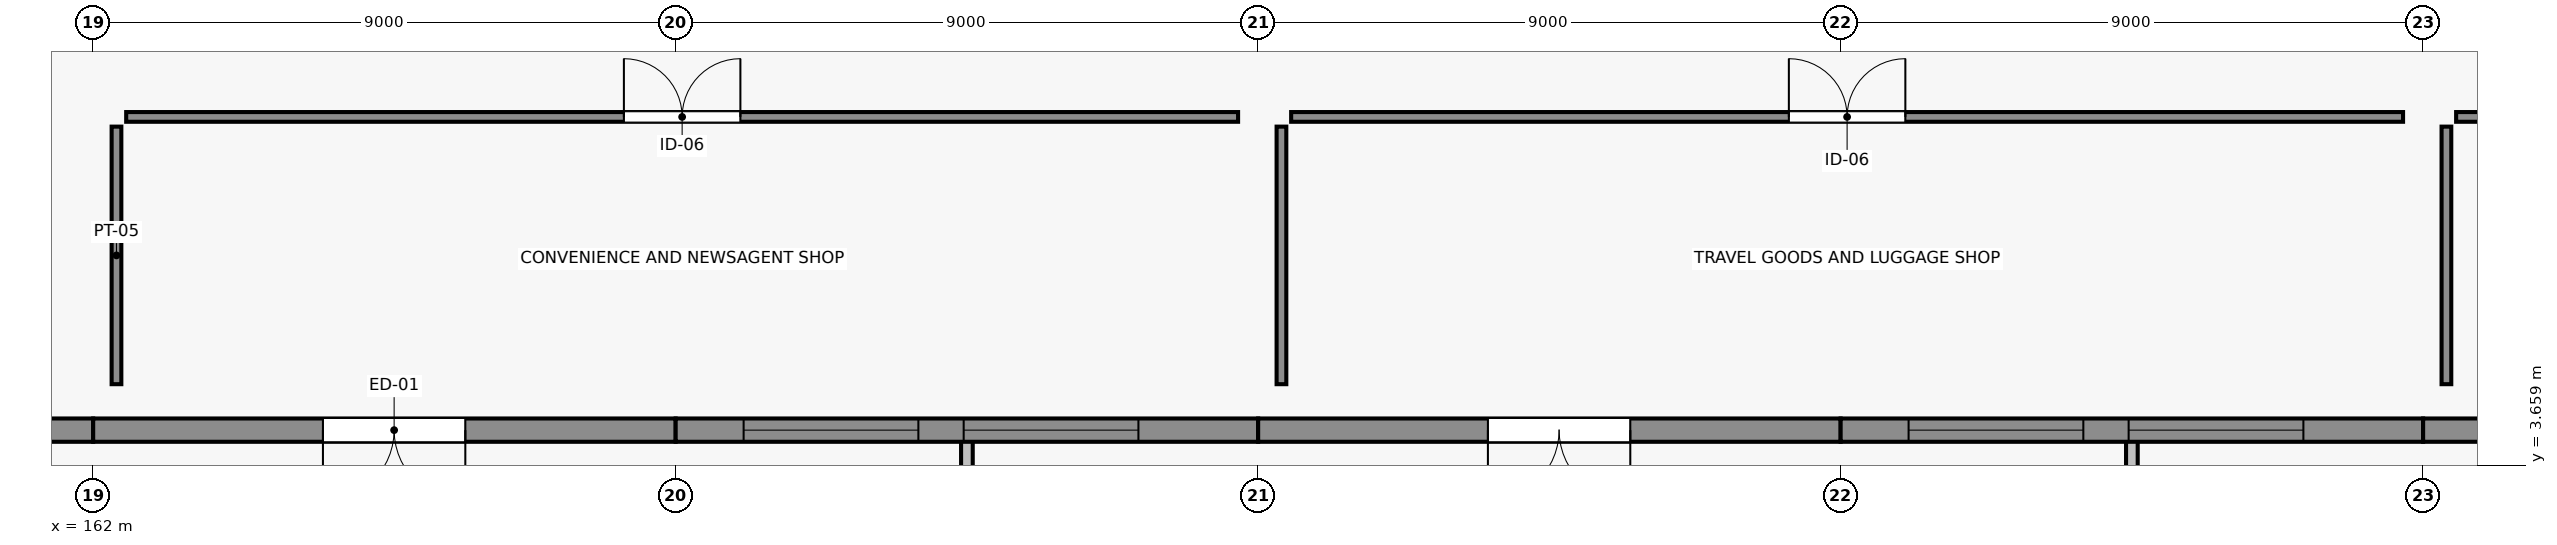
"""IFC4 building model, lengths in metres.
Left out: names, types, materials, properties, quantities, classifications, styles, units other than length and angle.
Written with IfcOpenShell. Run it as: python <this file> out.ifc"""

import sys

from ifc_helpers import new_model, si_unit, direction, frame, frame_2d, origin, place, context, subcontext, project, spatial, rectangle, extrude, element, fill, save


model = new_model("IFC4")
c1 = context("Model", 3, precision=1e-05, world=origin(), true_north=direction((0.0, 1.0)))
c2 = subcontext(c1, "Body", "Model", "MODEL_VIEW")
j1 = project(units=[si_unit("LENGTHUNIT", "METRE"), si_unit("PLANEANGLEUNIT", "RADIAN")], contexts=[c1])
p1 = place(None, origin())
s1 = spatial("IfcSite", under=j1, at=p1, CompositionType="ELEMENT")
p2 = place(p1, origin())
s2 = spatial("IfcBuilding", under=s1, at=p2, CompositionType="ELEMENT")
p3 = place(p2, origin())
s3 = spatial("IfcBuildingStorey", under=s2, at=p3, CompositionType="ELEMENT", Elevation=0.0)
p4 = place(p3, frame((162.0, 4.2, 0.0), z_axis=(0.0, 0.0, 1.0), x_axis=(-1.0, 0.0, 0.0)))
e1 = element("IfcWall", 1, at=p4, inside=s3, PredefinedType="SOLIDWALL", context=c2, shape_type="SweptSolid", body=[
    extrude(rectangle(XDim=9.0, YDim=0.36, at=frame_2d((4.5, 0.0))), origin(), (0.0, 0.0, 1.0), 4.15),
])
p5 = place(p4, frame((1.85, 0.0, 1.0)))
e2 = element("IfcOpeningElement", 2, at=p5, cuts=e1, PredefinedType="OPENING", context=c2, shape_type="SweptSolid", body=[
    extrude(rectangle(XDim=2.7, YDim=1.8, at=frame_2d((1.35, 0.9))), frame((0.0, 0.19, 0.0), z_axis=(0.0, -1.0, 0.0), x_axis=(1.0, 0.0, 0.0)), (0.0, 0.0, 1.0), 0.38),
])
p6 = place(p4, frame((5.25, 0.0, 1.0)))
e3 = element("IfcOpeningElement", 3, at=p6, cuts=e1, PredefinedType="OPENING", context=c2, shape_type="SweptSolid", body=[
    extrude(rectangle(XDim=2.7, YDim=1.8, at=frame_2d((1.35, 0.9))), frame((0.0, 0.19, 0.0), z_axis=(0.0, -1.0, 0.0), x_axis=(1.0, 0.0, 0.0)), (0.0, 0.0, 1.0), 0.38),
])
p7 = place(p3, frame((171.0, 4.2, 0.0), z_axis=(0.0, 0.0, 1.0), x_axis=(-1.0, 0.0, 0.0)))
e4 = element("IfcWall", 4, at=p7, inside=s3, PredefinedType="SOLIDWALL", context=c2, shape_type="SweptSolid", body=[
    extrude(rectangle(XDim=9.0, YDim=0.36, at=frame_2d((4.5, 0.0))), origin(), (0.0, 0.0, 1.0), 4.15),
])
p8 = place(p7, frame((3.25, 0.0, 0.0)))
e5 = element("IfcOpeningElement", 5, at=p8, cuts=e4, PredefinedType="OPENING", context=c2, shape_type="SweptSolid", body=[
    extrude(rectangle(XDim=2.2, YDim=2.4, at=frame_2d((1.1, 1.2))), frame((0.0, 0.19, 0.0), z_axis=(0.0, -1.0, 0.0), x_axis=(1.0, 0.0, 0.0)), (0.0, 0.0, 1.0), 0.38),
])
p9 = place(p3, frame((180.0, 4.2, 0.0), z_axis=(0.0, 0.0, 1.0), x_axis=(-1.0, 0.0, 0.0)))
e6 = element("IfcWall", 6, at=p9, inside=s3, PredefinedType="SOLIDWALL", context=c2, shape_type="SweptSolid", body=[
    extrude(rectangle(XDim=9.0, YDim=0.36, at=frame_2d((4.5, 0.0))), origin(), (0.0, 0.0, 1.0), 4.15),
])
p10 = place(p9, frame((1.85, 0.0, 1.0)))
e7 = element("IfcOpeningElement", 7, at=p10, cuts=e6, PredefinedType="OPENING", context=c2, shape_type="SweptSolid", body=[
    extrude(rectangle(XDim=2.7, YDim=1.8, at=frame_2d((1.35, 0.9))), frame((0.0, 0.19, 0.0), z_axis=(0.0, -1.0, 0.0), x_axis=(1.0, 0.0, 0.0)), (0.0, 0.0, 1.0), 0.38),
])
p11 = place(p9, frame((5.25, 0.0, 1.0)))
e8 = element("IfcOpeningElement", 8, at=p11, cuts=e6, PredefinedType="OPENING", context=c2, shape_type="SweptSolid", body=[
    extrude(rectangle(XDim=2.7, YDim=1.8, at=frame_2d((1.35, 0.9))), frame((0.0, 0.19, 0.0), z_axis=(0.0, -1.0, 0.0), x_axis=(1.0, 0.0, 0.0)), (0.0, 0.0, 1.0), 0.38),
])
p12 = place(p3, frame((189.0, 4.2, 0.0), z_axis=(0.0, 0.0, 1.0), x_axis=(-1.0, 0.0, 0.0)))
e9 = element("IfcWall", 9, at=p12, inside=s3, PredefinedType="SOLIDWALL", context=c2, shape_type="SweptSolid", body=[
    extrude(rectangle(XDim=9.0, YDim=0.36, at=frame_2d((4.5, 0.0))), origin(), (0.0, 0.0, 1.0), 4.15),
])
p13 = place(p12, frame((3.25, 0.0, 0.0)))
e10 = element("IfcOpeningElement", 10, at=p13, cuts=e9, PredefinedType="OPENING", context=c2, shape_type="SweptSolid", body=[
    extrude(rectangle(XDim=2.2, YDim=2.4, at=frame_2d((1.1, 1.2))), frame((0.0, 0.19, 0.0), z_axis=(0.0, -1.0, 0.0), x_axis=(1.0, 0.0, 0.0)), (0.0, 0.0, 1.0), 0.38),
])
p14 = place(p3, frame((198.0, 4.2, 0.0), z_axis=(0.0, 0.0, 1.0), x_axis=(-1.0, 0.0, 0.0)))
e11 = element("IfcWall", 11, at=p14, inside=s3, PredefinedType="SOLIDWALL", context=c2, shape_type="SweptSolid", body=[
    extrude(rectangle(XDim=9.0, YDim=0.36, at=frame_2d((4.5, 0.0))), origin(), (0.0, 0.0, 1.0), 4.15),
])
p15 = place(p14, frame((1.85, 0.0, 1.0)))
e12 = element("IfcOpeningElement", 12, at=p15, cuts=e11, PredefinedType="OPENING", context=c2, shape_type="SweptSolid", body=[
    extrude(rectangle(XDim=2.7, YDim=1.8, at=frame_2d((1.35, 0.9))), frame((0.0, 0.19, 0.0), z_axis=(0.0, -1.0, 0.0), x_axis=(1.0, 0.0, 0.0)), (0.0, 0.0, 1.0), 0.38),
])
p16 = place(p14, frame((5.25, 0.0, 1.0)))
e13 = element("IfcOpeningElement", 13, at=p16, cuts=e11, PredefinedType="OPENING", context=c2, shape_type="SweptSolid", body=[
    extrude(rectangle(XDim=2.7, YDim=1.8, at=frame_2d((1.35, 0.9))), frame((0.0, 0.19, 0.0), z_axis=(0.0, -1.0, 0.0), x_axis=(1.0, 0.0, 0.0)), (0.0, 0.0, 1.0), 0.38),
])
p17 = place(p3, frame((207.0, 4.2, 0.0), z_axis=(0.0, 0.0, 1.0), x_axis=(-1.0, 0.0, 0.0)))
e14 = element("IfcWall", 14, at=p17, inside=s3, PredefinedType="SOLIDWALL", context=c2, shape_type="SweptSolid", body=[
    extrude(rectangle(XDim=9.0, YDim=0.36, at=frame_2d((4.5, 0.0))), origin(), (0.0, 0.0, 1.0), 4.15),
])
p18 = place(p17, frame((3.25, 0.0, 0.0)))
e15 = element("IfcOpeningElement", 15, at=p18, cuts=e14, PredefinedType="OPENING", context=c2, shape_type="SweptSolid", body=[
    extrude(rectangle(XDim=2.2, YDim=2.4, at=frame_2d((1.1, 1.2))), frame((0.0, 0.19, 0.0), z_axis=(0.0, -1.0, 0.0), x_axis=(1.0, 0.0, 0.0)), (0.0, 0.0, 1.0), 0.38),
])
p19 = place(p3, frame((162.51, 9.04, 0.0), z_axis=(0.0, 0.0, 1.0), x_axis=(1.0, 0.0, 0.0)))
e16 = element("IfcWall", 16, at=p19, inside=s3, PredefinedType="PARTITIONING", context=c2, shape_type="SweptSolid", body=[
    extrude(rectangle(XDim=17.18, YDim=0.15, at=frame_2d((8.59, 0.0))), origin(), (0.0, 0.0, 1.0), 3.975),
])
p20 = place(p19, frame((7.69, 0.0, 0.0)))
e17 = element("IfcOpeningElement", 17, at=p20, cuts=e16, PredefinedType="OPENING", context=c2, shape_type="SweptSolid", body=[
    extrude(rectangle(XDim=1.8, YDim=2.3, at=frame_2d((0.9, 1.15))), frame((0.0, 0.085, 0.0), z_axis=(0.0, -1.0, 0.0), x_axis=(1.0, 0.0, 0.0)), (0.0, 0.0, 1.0), 0.17),
])
p21 = place(p3, frame((162.36, 4.91, 0.0), z_axis=(0.0, 0.0, 1.0), x_axis=(0.0, 1.0, 0.0)))
e18 = element("IfcWall", 18, at=p21, inside=s3, PredefinedType="PARTITIONING", context=c2, shape_type="SweptSolid", body=[
    extrude(rectangle(XDim=3.98, YDim=0.15, at=frame_2d((1.99, 0.0))), origin(), (0.0, 0.0, 1.0), 4.55),
])
p22 = place(p3, frame((180.51, 9.04, 0.0), z_axis=(0.0, 0.0, 1.0), x_axis=(1.0, 0.0, 0.0)))
e19 = element("IfcWall", 19, at=p22, inside=s3, PredefinedType="PARTITIONING", context=c2, shape_type="SweptSolid", body=[
    extrude(rectangle(XDim=17.18, YDim=0.15, at=frame_2d((8.59, 0.0))), origin(), (0.0, 0.0, 1.0), 3.975),
])
p23 = place(p22, frame((7.69, 0.0, 0.0)))
e20 = element("IfcOpeningElement", 20, at=p23, cuts=e19, PredefinedType="OPENING", context=c2, shape_type="SweptSolid", body=[
    extrude(rectangle(XDim=1.8, YDim=2.3, at=frame_2d((0.9, 1.15))), frame((0.0, 0.085, 0.0), z_axis=(0.0, -1.0, 0.0), x_axis=(1.0, 0.0, 0.0)), (0.0, 0.0, 1.0), 0.17),
])
p24 = place(p3, frame((180.36, 4.91, 0.0), z_axis=(0.0, 0.0, 1.0), x_axis=(0.0, 1.0, 0.0)))
e21 = element("IfcWall", 21, at=p24, inside=s3, PredefinedType="PARTITIONING", context=c2, shape_type="SweptSolid", body=[
    extrude(rectangle(XDim=3.98, YDim=0.15, at=frame_2d((1.99, 0.0))), origin(), (0.0, 0.0, 1.0), 4.55),
])
p25 = place(p3, frame((198.51, 9.04, 0.0), z_axis=(0.0, 0.0, 1.0), x_axis=(1.0, 0.0, 0.0)))
e22 = element("IfcWall", 22, at=p25, inside=s3, PredefinedType="PARTITIONING", context=c2, shape_type="SweptSolid", body=[
    extrude(rectangle(XDim=16.68, YDim=0.15, at=frame_2d((8.34, 0.0))), origin(), (0.0, 0.0, 1.0), 3.975),
])
p26 = place(p25, frame((7.44, 0.0, 0.0)))
e23 = element("IfcOpeningElement", 23, at=p26, cuts=e22, PredefinedType="OPENING", context=c2, shape_type="SweptSolid", body=[
    extrude(rectangle(XDim=1.8, YDim=2.3, at=frame_2d((0.9, 1.15))), frame((0.0, 0.085, 0.0), z_axis=(0.0, -1.0, 0.0), x_axis=(1.0, 0.0, 0.0)), (0.0, 0.0, 1.0), 0.17),
])
p27 = place(p3, frame((198.36, 4.91, 0.0), z_axis=(0.0, 0.0, 1.0), x_axis=(0.0, 1.0, 0.0)))
e24 = element("IfcWall", 24, at=p27, inside=s3, PredefinedType="PARTITIONING", context=c2, shape_type="SweptSolid", body=[
    extrude(rectangle(XDim=3.98, YDim=0.15, at=frame_2d((1.99, 0.0))), origin(), (0.0, 0.0, 1.0), 4.55),
])
p28 = place(p8, origin())
e25 = element("IfcDoor", 25, at=p28, inside=s3, OperationType="DOUBLE_DOOR_SINGLE_SWING", PredefinedType="DOOR", context=c2, shape_type="SweptSolid", body=[
    extrude(rectangle(XDim=2.2, YDim=2.4, at=frame_2d((1.1, 1.2))), frame((0.0, 0.025, 0.0), z_axis=(0.0, -1.0, 0.0), x_axis=(1.0, 0.0, 0.0)), (0.0, 0.0, 1.0), 0.05),
])
fill(e5, e25)
p29 = place(p10, origin())
e26 = element("IfcWindow", 26, at=p29, inside=s3, PartitioningType="SINGLE_PANEL", PredefinedType="WINDOW", context=c2, shape_type="SweptSolid", body=[
    extrude(rectangle(XDim=2.7, YDim=1.8, at=frame_2d((1.35, 0.9))), frame((0.0, 0.03, 0.0), z_axis=(0.0, -1.0, 0.0), x_axis=(1.0, 0.0, 0.0)), (0.0, 0.0, 1.0), 0.06),
])
fill(e7, e26)
p30 = place(p11, origin())
e27 = element("IfcWindow", 27, at=p30, inside=s3, PartitioningType="SINGLE_PANEL", PredefinedType="WINDOW", context=c2, shape_type="SweptSolid", body=[
    extrude(rectangle(XDim=2.7, YDim=1.8, at=frame_2d((1.35, 0.9))), frame((0.0, 0.03, 0.0), z_axis=(0.0, -1.0, 0.0), x_axis=(1.0, 0.0, 0.0)), (0.0, 0.0, 1.0), 0.06),
])
fill(e8, e27)
p31 = place(p13, origin())
e28 = element("IfcDoor", 28, at=p31, inside=s3, OperationType="DOUBLE_DOOR_SINGLE_SWING", PredefinedType="DOOR", context=c2, shape_type="SweptSolid", body=[
    extrude(rectangle(XDim=2.2, YDim=2.4, at=frame_2d((1.1, 1.2))), frame((0.0, 0.025, 0.0), z_axis=(0.0, -1.0, 0.0), x_axis=(1.0, 0.0, 0.0)), (0.0, 0.0, 1.0), 0.05),
])
fill(e10, e28)
p32 = place(p15, origin())
e29 = element("IfcWindow", 29, at=p32, inside=s3, PartitioningType="SINGLE_PANEL", PredefinedType="WINDOW", context=c2, shape_type="SweptSolid", body=[
    extrude(rectangle(XDim=2.7, YDim=1.8, at=frame_2d((1.35, 0.9))), frame((0.0, 0.03, 0.0), z_axis=(0.0, -1.0, 0.0), x_axis=(1.0, 0.0, 0.0)), (0.0, 0.0, 1.0), 0.06),
])
fill(e12, e29)
p33 = place(p16, origin())
e30 = element("IfcWindow", 30, at=p33, inside=s3, PartitioningType="SINGLE_PANEL", PredefinedType="WINDOW", context=c2, shape_type="SweptSolid", body=[
    extrude(rectangle(XDim=2.7, YDim=1.8, at=frame_2d((1.35, 0.9))), frame((0.0, 0.03, 0.0), z_axis=(0.0, -1.0, 0.0), x_axis=(1.0, 0.0, 0.0)), (0.0, 0.0, 1.0), 0.06),
])
fill(e13, e30)
p34 = place(p20, origin())
e31 = element("IfcDoor", 31, at=p34, inside=s3, OperationType="DOUBLE_DOOR_SINGLE_SWING", PredefinedType="DOOR", context=c2, shape_type="SweptSolid", body=[
    extrude(rectangle(XDim=1.8, YDim=2.3, at=frame_2d((0.9, 1.15))), frame((0.0, 0.025, 0.0), z_axis=(0.0, -1.0, 0.0), x_axis=(1.0, 0.0, 0.0)), (0.0, 0.0, 1.0), 0.05),
])
fill(e17, e31)
p35 = place(p23, origin())
e32 = element("IfcDoor", 32, at=p35, inside=s3, OperationType="DOUBLE_DOOR_SINGLE_SWING", PredefinedType="DOOR", context=c2, shape_type="SweptSolid", body=[
    extrude(rectangle(XDim=1.8, YDim=2.3, at=frame_2d((0.9, 1.15))), frame((0.0, 0.025, 0.0), z_axis=(0.0, -1.0, 0.0), x_axis=(1.0, 0.0, 0.0)), (0.0, 0.0, 1.0), 0.05),
])
fill(e20, e32)
save(model, sys.argv[1])
